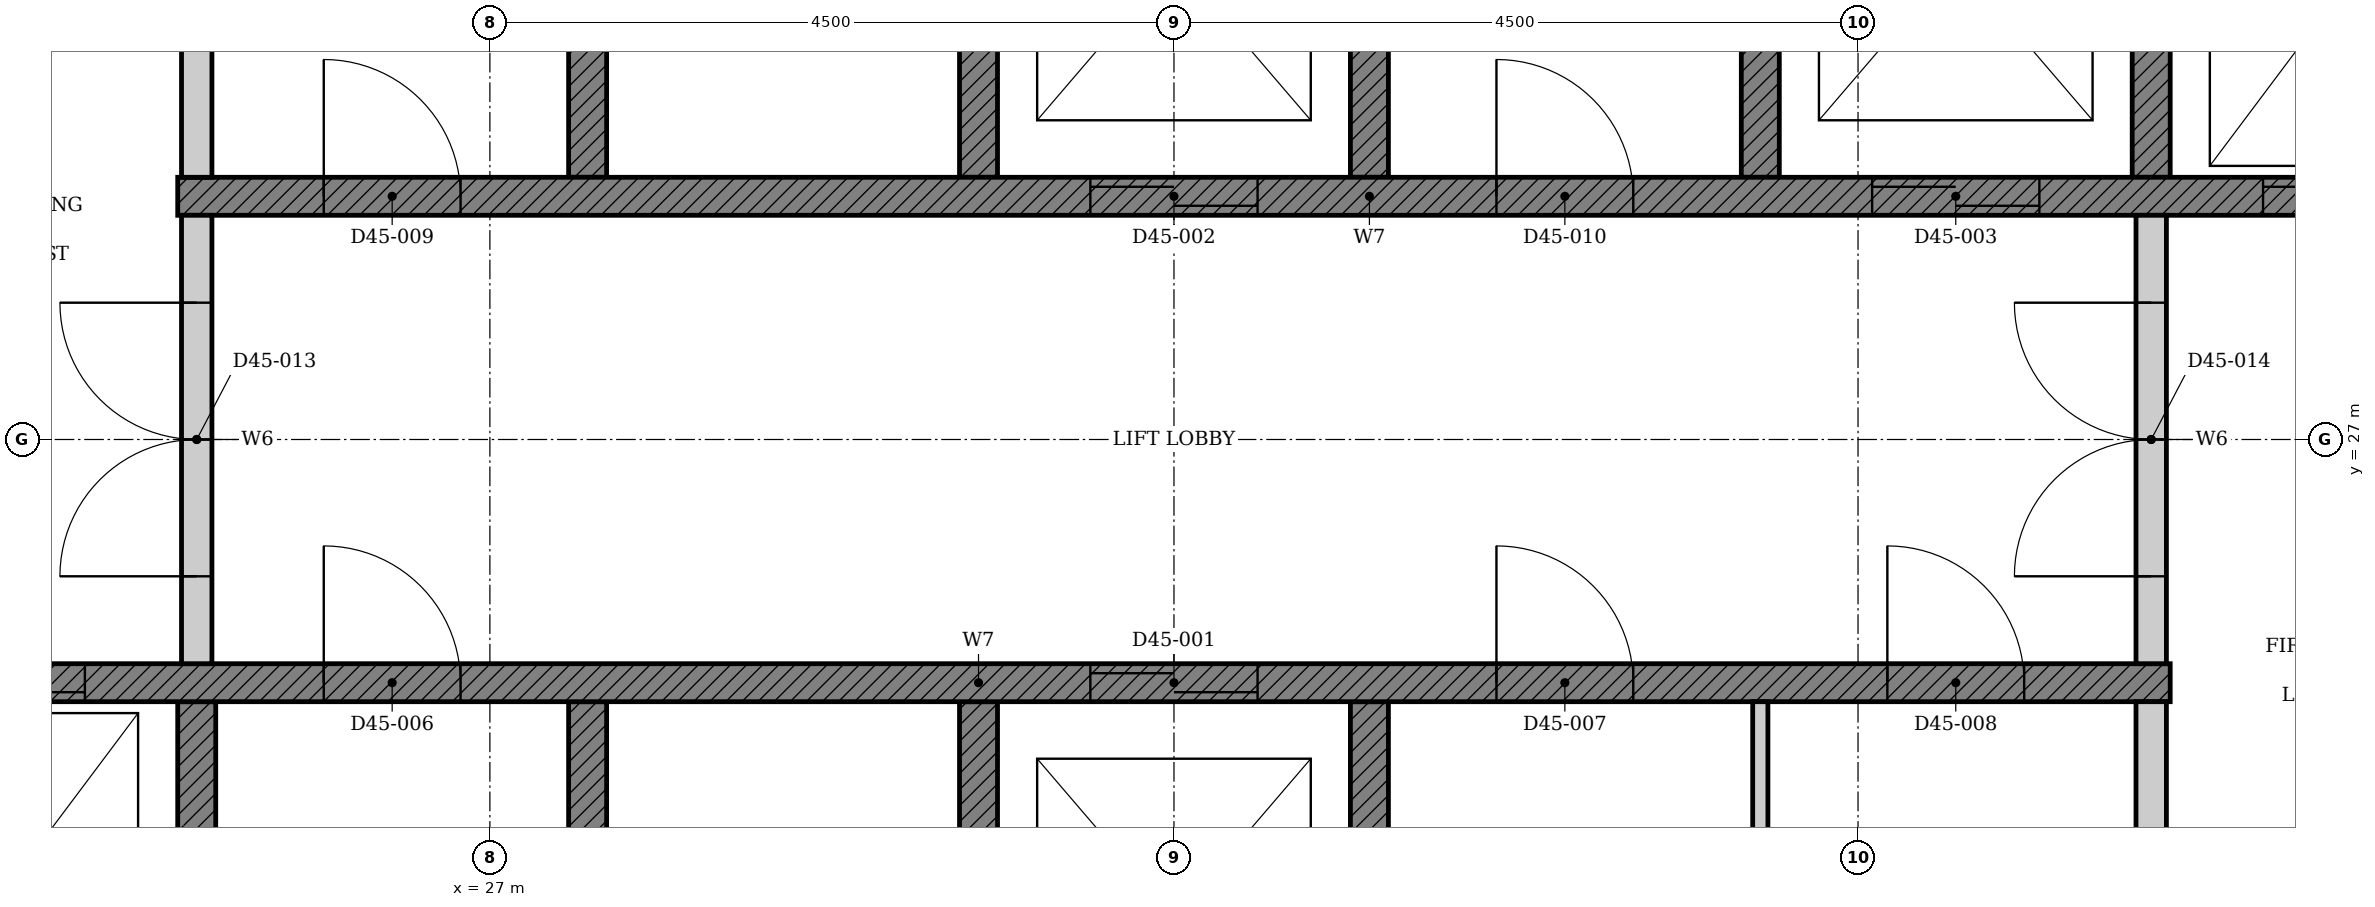
"""IFC4 building model, lengths in metres.
Left out: names, types, materials, properties, quantities, classifications, styles, units other than length and angle.
Written with IfcOpenShell. Run it as: python <this file> out.ifc"""

import sys

from ifc_helpers import new_model, si_unit, direction, frame, frame_2d, origin, place, context, subcontext, project, spatial, polyline, rectangle, outline, extrude, element, fill, save


model = new_model("IFC4")
c1 = context("Model", 3, precision=1e-05, world=origin(), true_north=direction((0.0, 1.0)))
c2 = subcontext(c1, "Body", "Model", "MODEL_VIEW")
j1 = project(units=[si_unit("LENGTHUNIT", "METRE"), si_unit("PLANEANGLEUNIT", "RADIAN")], contexts=[c1])
p1 = place(None, origin())
s1 = spatial("IfcSite", under=j1, at=p1, CompositionType="ELEMENT")
p2 = place(p1, origin())
s2 = spatial("IfcBuilding", under=s1, at=p2, CompositionType="ELEMENT")
p3 = place(p2, frame((0.0, 0.0, 180.2)))
s3 = spatial("IfcBuildingStorey", under=s2, at=p3, CompositionType="ELEMENT", Elevation=180.2)
p4 = place(p3, origin())
e1 = element("IfcWall", 1, at=p4, inside=s3, PredefinedType="SHEAR", context=c2, shape_type="SweptSolid", body=[
    extrude(outline(polyline([(22.375, 22.35), (25.197, 22.35), (25.197, 25.275), (24.947, 25.275), (24.947, 22.65), (22.625, 22.65), (22.625, 25.275), (22.375, 25.275), (22.375, 22.35)])), origin(), (0.0, 0.0, 1.0), 3.4),
])
p5 = place(p3, origin())
e2 = element("IfcWall", 2, at=p5, inside=s3, PredefinedType="SHEAR", context=c2, shape_type="SweptSolid", body=[
    extrude(outline(polyline([(27.518, 22.35), (32.911, 22.35), (32.911, 25.275), (32.661, 25.275), (32.661, 22.65), (30.339, 22.65), (30.339, 25.275), (30.089, 25.275), (30.089, 22.65), (27.768, 22.65), (27.768, 25.275), (27.518, 25.275), (27.518, 22.35)])), origin(), (0.0, 0.0, 1.0), 3.4),
])
p6 = place(p3, origin())
e3 = element("IfcWall", 3, at=p6, inside=s3, PredefinedType="SHEAR", context=c2, shape_type="SweptSolid", body=[
    extrude(outline(polyline([(27.518, 28.725), (27.768, 28.725), (27.768, 31.35), (30.089, 31.35), (30.089, 28.725), (30.339, 28.725), (30.339, 31.35), (32.661, 31.35), (32.661, 28.725), (32.911, 28.725), (32.911, 31.65), (27.518, 31.65), (27.518, 28.725)])), origin(), (0.0, 0.0, 1.0), 3.4),
])
p7 = place(p3, origin())
e4 = element("IfcWall", 4, at=p7, inside=s3, PredefinedType="SHEAR", context=c2, shape_type="SweptSolid", body=[
    extrude(outline(polyline([(35.232, 28.725), (35.482, 28.725), (35.482, 31.35), (37.803, 31.35), (37.803, 28.725), (38.053, 28.725), (38.053, 31.35), (40.375, 31.35), (40.375, 28.725), (40.625, 28.725), (40.625, 31.65), (35.232, 31.65), (35.232, 28.725)])), origin(), (0.0, 0.0, 1.0), 3.4),
])
p8 = place(p3, frame((22.375, 25.4, 0.0), z_axis=(0.0, 0.0, 1.0), x_axis=(1.0, 0.0, 0.0)))
e5 = element("IfcWall", 5, at=p8, inside=s3, PredefinedType="SHEAR", context=c2, shape_type="SweptSolid", body=[
    extrude(rectangle(XDim=15.678, YDim=0.25, at=frame_2d((7.839, 0.0))), origin(), (0.0, 0.0, 1.0), 3.4),
])
p9 = place(p8, frame((8.575, 0.0, 0.0)))
e6 = element("IfcOpeningElement", 6, at=p9, cuts=e5, PredefinedType="OPENING", context=c2, shape_type="SweptSolid", body=[
    extrude(rectangle(XDim=1.1, YDim=2.1, at=frame_2d((0.55, 1.05))), frame((0.0, 0.135, 0.0), z_axis=(0.0, -1.0, 0.0), x_axis=(1.0, 0.0, 0.0)), (0.0, 0.0, 1.0), 0.27),
])
p10 = place(p8, frame((0.861, 0.0, 0.0)))
e7 = element("IfcOpeningElement", 7, at=p10, cuts=e5, PredefinedType="OPENING", context=c2, shape_type="SweptSolid", body=[
    extrude(rectangle(XDim=1.1, YDim=2.1, at=frame_2d((0.55, 1.05))), frame((0.0, 0.135, 0.0), z_axis=(0.0, -1.0, 0.0), x_axis=(1.0, 0.0, 0.0)), (0.0, 0.0, 1.0), 0.27),
])
p11 = place(p8, frame((3.532, 0.0, 0.0)))
e8 = element("IfcOpeningElement", 8, at=p11, cuts=e5, PredefinedType="OPENING", context=c2, shape_type="SweptSolid", body=[
    extrude(rectangle(XDim=0.9, YDim=2.1, at=frame_2d((0.45, 1.05))), frame((0.0, 0.135, 0.0), z_axis=(0.0, -1.0, 0.0), x_axis=(1.0, 0.0, 0.0)), (0.0, 0.0, 1.0), 0.27),
])
p12 = place(p8, frame((11.246, 0.0, 0.0)))
e9 = element("IfcOpeningElement", 9, at=p12, cuts=e5, PredefinedType="OPENING", context=c2, shape_type="SweptSolid", body=[
    extrude(rectangle(XDim=0.9, YDim=2.1, at=frame_2d((0.45, 1.05))), frame((0.0, 0.135, 0.0), z_axis=(0.0, -1.0, 0.0), x_axis=(1.0, 0.0, 0.0)), (0.0, 0.0, 1.0), 0.27),
])
p13 = place(p8, frame((13.818, 0.0, 0.0)))
e10 = element("IfcOpeningElement", 10, at=p13, cuts=e5, PredefinedType="OPENING", context=c2, shape_type="SweptSolid", body=[
    extrude(rectangle(XDim=0.9, YDim=2.1, at=frame_2d((0.45, 1.05))), frame((0.0, 0.135, 0.0), z_axis=(0.0, -1.0, 0.0), x_axis=(1.0, 0.0, 0.0)), (0.0, 0.0, 1.0), 0.27),
])
p14 = place(p3, frame((24.947, 28.6, 0.0), z_axis=(0.0, 0.0, 1.0), x_axis=(1.0, 0.0, 0.0)))
e11 = element("IfcWall", 11, at=p14, inside=s3, PredefinedType="SHEAR", context=c2, shape_type="SweptSolid", body=[
    extrude(rectangle(XDim=15.678, YDim=0.25, at=frame_2d((7.839, 0.0))), origin(), (0.0, 0.0, 1.0), 3.4),
])
p15 = place(p14, frame((6.004, 0.0, 0.0)))
e12 = element("IfcOpeningElement", 12, at=p15, cuts=e11, PredefinedType="OPENING", context=c2, shape_type="SweptSolid", body=[
    extrude(rectangle(XDim=1.1, YDim=2.1, at=frame_2d((0.55, 1.05))), frame((0.0, 0.135, 0.0), z_axis=(0.0, -1.0, 0.0), x_axis=(1.0, 0.0, 0.0)), (0.0, 0.0, 1.0), 0.27),
])
p16 = place(p14, frame((11.146, 0.0, 0.0)))
e13 = element("IfcOpeningElement", 13, at=p16, cuts=e11, PredefinedType="OPENING", context=c2, shape_type="SweptSolid", body=[
    extrude(rectangle(XDim=1.1, YDim=2.1, at=frame_2d((0.55, 1.05))), frame((0.0, 0.135, 0.0), z_axis=(0.0, -1.0, 0.0), x_axis=(1.0, 0.0, 0.0)), (0.0, 0.0, 1.0), 0.27),
])
p17 = place(p14, frame((13.718, 0.0, 0.0)))
e14 = element("IfcOpeningElement", 14, at=p17, cuts=e11, PredefinedType="OPENING", context=c2, shape_type="SweptSolid", body=[
    extrude(rectangle(XDim=1.1, YDim=2.1, at=frame_2d((0.55, 1.05))), frame((0.0, 0.135, 0.0), z_axis=(0.0, -1.0, 0.0), x_axis=(1.0, 0.0, 0.0)), (0.0, 0.0, 1.0), 0.27),
])
p18 = place(p14, frame((0.961, 0.0, 0.0)))
e15 = element("IfcOpeningElement", 15, at=p18, cuts=e11, PredefinedType="OPENING", context=c2, shape_type="SweptSolid", body=[
    extrude(rectangle(XDim=0.9, YDim=2.1, at=frame_2d((0.45, 1.05))), frame((0.0, 0.135, 0.0), z_axis=(0.0, -1.0, 0.0), x_axis=(1.0, 0.0, 0.0)), (0.0, 0.0, 1.0), 0.27),
])
p19 = place(p14, frame((8.675, 0.0, 0.0)))
e16 = element("IfcOpeningElement", 16, at=p19, cuts=e11, PredefinedType="OPENING", context=c2, shape_type="SweptSolid", body=[
    extrude(rectangle(XDim=0.9, YDim=2.1, at=frame_2d((0.45, 1.05))), frame((0.0, 0.135, 0.0), z_axis=(0.0, -1.0, 0.0), x_axis=(1.0, 0.0, 0.0)), (0.0, 0.0, 1.0), 0.27),
])
p20 = place(p3, frame((37.928, 22.65, 0.0), z_axis=(0.0, 0.0, 1.0), x_axis=(0.0, 1.0, 0.0)))
e17 = element("IfcWall", 17, at=p20, inside=s3, PredefinedType="PARTITIONING", context=c2, shape_type="SweptSolid", body=[
    extrude(rectangle(XDim=2.625, YDim=0.2, at=frame_2d((1.312, 0.0))), origin(), (0.0, 0.0, 1.0), 3.4),
])
p21 = place(p3, frame((35.357, 22.65, 0.0), z_axis=(0.0, 0.0, 1.0), x_axis=(0.0, 1.0, 0.0)))
e18 = element("IfcWall", 18, at=p21, inside=s3, PredefinedType="PARTITIONING", context=c2, shape_type="SweptSolid", body=[
    extrude(rectangle(XDim=2.625, YDim=0.1, at=frame_2d((1.312, 0.0))), origin(), (0.0, 0.0, 1.0), 3.4),
])
p22 = place(p3, frame((25.072, 28.725, 0.0), z_axis=(0.0, 0.0, 1.0), x_axis=(0.0, 1.0, 0.0)))
e19 = element("IfcWall", 19, at=p22, inside=s3, PredefinedType="PARTITIONING", context=c2, shape_type="SweptSolid", body=[
    extrude(rectangle(XDim=2.625, YDim=0.2, at=frame_2d((1.312, 0.0))), origin(), (0.0, 0.0, 1.0), 3.4),
])
p23 = place(p3, frame((25.072, 25.525, 0.0), z_axis=(0.0, 0.0, 1.0), x_axis=(0.0, 1.0, 0.0)))
e20 = element("IfcWall", 20, at=p23, inside=s3, PredefinedType="PARTITIONING", context=c2, shape_type="SweptSolid", body=[
    extrude(rectangle(XDim=2.95, YDim=0.2, at=frame_2d((1.475, 0.0))), origin(), (0.0, 0.0, 1.0), 3.4),
])
p24 = place(p23, frame((0.575, 0.0, 0.0)))
e21 = element("IfcOpeningElement", 21, at=p24, cuts=e20, PredefinedType="OPENING", context=c2, shape_type="SweptSolid", body=[
    extrude(rectangle(XDim=1.8, YDim=2.1, at=frame_2d((0.9, 1.05))), frame((0.0, 0.11, 0.0), z_axis=(0.0, -1.0, 0.0), x_axis=(1.0, 0.0, 0.0)), (0.0, 0.0, 1.0), 0.22),
])
p25 = place(p3, frame((37.928, 25.525, 0.0), z_axis=(0.0, 0.0, 1.0), x_axis=(0.0, 1.0, 0.0)))
e22 = element("IfcWall", 22, at=p25, inside=s3, PredefinedType="PARTITIONING", context=c2, shape_type="SweptSolid", body=[
    extrude(rectangle(XDim=2.95, YDim=0.2, at=frame_2d((1.475, 0.0))), origin(), (0.0, 0.0, 1.0), 3.4),
])
p26 = place(p25, frame((0.575, 0.0, 0.0)))
e23 = element("IfcOpeningElement", 23, at=p26, cuts=e22, PredefinedType="OPENING", context=c2, shape_type="SweptSolid", body=[
    extrude(rectangle(XDim=1.8, YDim=2.1, at=frame_2d((0.9, 1.05))), frame((0.0, 0.11, 0.0), z_axis=(0.0, -1.0, 0.0), x_axis=(1.0, 0.0, 0.0)), (0.0, 0.0, 1.0), 0.22),
])
p27 = place(p9, origin())
e24 = element("IfcDoor", 24, at=p27, inside=s3, OperationType="DOUBLE_DOOR_SLIDING", PredefinedType="DOOR", context=c2, shape_type="SweptSolid", body=[
    extrude(rectangle(XDim=1.1, YDim=2.1, at=frame_2d((0.55, 1.05))), frame((0.0, 0.025, 0.0), z_axis=(0.0, -1.0, 0.0), x_axis=(1.0, 0.0, 0.0)), (0.0, 0.0, 1.0), 0.05),
])
fill(e6, e24)
p28 = place(p15, origin())
e25 = element("IfcDoor", 25, at=p28, inside=s3, OperationType="DOUBLE_DOOR_SLIDING", PredefinedType="DOOR", context=c2, shape_type="SweptSolid", body=[
    extrude(rectangle(XDim=1.1, YDim=2.1, at=frame_2d((0.55, 1.05))), frame((0.0, 0.025, 0.0), z_axis=(0.0, -1.0, 0.0), x_axis=(1.0, 0.0, 0.0)), (0.0, 0.0, 1.0), 0.05),
])
fill(e12, e25)
p29 = place(p16, origin())
e26 = element("IfcDoor", 26, at=p29, inside=s3, OperationType="DOUBLE_DOOR_SLIDING", PredefinedType="DOOR", context=c2, shape_type="SweptSolid", body=[
    extrude(rectangle(XDim=1.1, YDim=2.1, at=frame_2d((0.55, 1.05))), frame((0.0, 0.025, 0.0), z_axis=(0.0, -1.0, 0.0), x_axis=(1.0, 0.0, 0.0)), (0.0, 0.0, 1.0), 0.05),
])
fill(e13, e26)
p30 = place(p10, origin())
e27 = element("IfcDoor", 27, at=p30, inside=s3, OperationType="DOUBLE_DOOR_SLIDING", PredefinedType="DOOR", context=c2, shape_type="SweptSolid", body=[
    extrude(rectangle(XDim=1.1, YDim=2.1, at=frame_2d((0.55, 1.05))), frame((0.0, 0.025, 0.0), z_axis=(0.0, -1.0, 0.0), x_axis=(1.0, 0.0, 0.0)), (0.0, 0.0, 1.0), 0.05),
])
fill(e7, e27)
p31 = place(p17, origin())
e28 = element("IfcDoor", 28, at=p31, inside=s3, OperationType="DOUBLE_DOOR_SLIDING", PredefinedType="DOOR", context=c2, shape_type="SweptSolid", body=[
    extrude(rectangle(XDim=1.1, YDim=2.1, at=frame_2d((0.55, 1.05))), frame((0.0, 0.025, 0.0), z_axis=(0.0, -1.0, 0.0), x_axis=(1.0, 0.0, 0.0)), (0.0, 0.0, 1.0), 0.05),
])
fill(e14, e28)
p32 = place(p11, origin())
e29 = element("IfcDoor", 29, at=p32, inside=s3, OperationType="SINGLE_SWING_LEFT", PredefinedType="DOOR", context=c2, shape_type="SweptSolid", body=[
    extrude(rectangle(XDim=0.9, YDim=2.1, at=frame_2d((0.45, 1.05))), frame((0.0, 0.025, 0.0), z_axis=(0.0, -1.0, 0.0), x_axis=(1.0, 0.0, 0.0)), (0.0, 0.0, 1.0), 0.05),
])
fill(e8, e29)
p33 = place(p12, origin())
e30 = element("IfcDoor", 30, at=p33, inside=s3, OperationType="SINGLE_SWING_LEFT", PredefinedType="DOOR", context=c2, shape_type="SweptSolid", body=[
    extrude(rectangle(XDim=0.9, YDim=2.1, at=frame_2d((0.45, 1.05))), frame((0.0, 0.025, 0.0), z_axis=(0.0, -1.0, 0.0), x_axis=(1.0, 0.0, 0.0)), (0.0, 0.0, 1.0), 0.05),
])
fill(e9, e30)
p34 = place(p13, origin())
e31 = element("IfcDoor", 31, at=p34, inside=s3, OperationType="SINGLE_SWING_LEFT", PredefinedType="DOOR", context=c2, shape_type="SweptSolid", body=[
    extrude(rectangle(XDim=0.9, YDim=2.1, at=frame_2d((0.45, 1.05))), frame((0.0, 0.025, 0.0), z_axis=(0.0, -1.0, 0.0), x_axis=(1.0, 0.0, 0.0)), (0.0, 0.0, 1.0), 0.05),
])
fill(e10, e31)
p35 = place(p18, origin())
e32 = element("IfcDoor", 32, at=p35, inside=s3, OperationType="SINGLE_SWING_LEFT", PredefinedType="DOOR", context=c2, shape_type="SweptSolid", body=[
    extrude(rectangle(XDim=0.9, YDim=2.1, at=frame_2d((0.45, 1.05))), frame((0.0, 0.025, 0.0), z_axis=(0.0, -1.0, 0.0), x_axis=(1.0, 0.0, 0.0)), (0.0, 0.0, 1.0), 0.05),
])
fill(e15, e32)
p36 = place(p19, origin())
e33 = element("IfcDoor", 33, at=p36, inside=s3, OperationType="SINGLE_SWING_LEFT", PredefinedType="DOOR", context=c2, shape_type="SweptSolid", body=[
    extrude(rectangle(XDim=0.9, YDim=2.1, at=frame_2d((0.45, 1.05))), frame((0.0, 0.025, 0.0), z_axis=(0.0, -1.0, 0.0), x_axis=(1.0, 0.0, 0.0)), (0.0, 0.0, 1.0), 0.05),
])
fill(e16, e33)
p37 = place(p24, origin())
e34 = element("IfcDoor", 34, at=p37, inside=s3, OperationType="DOUBLE_DOOR_SINGLE_SWING", PredefinedType="DOOR", context=c2, shape_type="SweptSolid", body=[
    extrude(rectangle(XDim=1.8, YDim=2.1, at=frame_2d((0.9, 1.05))), frame((0.0, 0.025, 0.0), z_axis=(0.0, -1.0, 0.0), x_axis=(1.0, 0.0, 0.0)), (0.0, 0.0, 1.0), 0.05),
])
fill(e21, e34)
p38 = place(p26, origin())
e35 = element("IfcDoor", 35, at=p38, inside=s3, OperationType="DOUBLE_DOOR_SINGLE_SWING", PredefinedType="DOOR", context=c2, shape_type="SweptSolid", body=[
    extrude(rectangle(XDim=1.8, YDim=2.1, at=frame_2d((0.9, 1.05))), frame((0.0, 0.025, 0.0), z_axis=(0.0, -1.0, 0.0), x_axis=(1.0, 0.0, 0.0)), (0.0, 0.0, 1.0), 0.05),
])
fill(e23, e35)
save(model, sys.argv[1])
